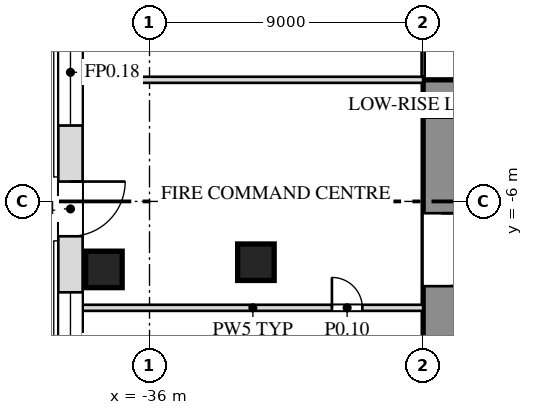
"""IFC4 building model, lengths in metres.
Left out: names, types, materials, properties, quantities, classifications, styles, units other than length and angle.
Written with IfcOpenShell. Run it as: python <this file> out.ifc"""

import sys

from ifc_helpers import new_model, si_unit, direction, frame, frame_2d, origin, origin_2d, place, context, subcontext, project, spatial, rectangle, extrude, element, fill, save


model = new_model("IFC4")
c1 = context("Model", 3, precision=1e-05, world=origin(), true_north=direction((0.0, 1.0)))
c2 = subcontext(c1, "Body", "Model", "MODEL_VIEW")
j1 = project(units=[si_unit("LENGTHUNIT", "METRE"), si_unit("PLANEANGLEUNIT", "RADIAN")], contexts=[c1])
p1 = place(None, origin())
s1 = spatial("IfcSite", under=j1, at=p1, CompositionType="ELEMENT")
p2 = place(p1, origin())
s2 = spatial("IfcBuilding", under=s1, at=p2, CompositionType="ELEMENT")
p3 = place(p2, origin())
s3 = spatial("IfcBuildingStorey", under=s2, at=p3, CompositionType="ELEMENT", Elevation=0.0)
for number, where, z_axis, x_axis in (
    (1, (-37.5, -8.236, 0.0), (0.0, 0.0, 1.0), (1.0, 0.0, 0.0)),
    (2, (-32.5, -8.0, 0.0), (0.0, 0.0, 1.0), (1.0, 0.0, 0.0)),
):
    element("IfcColumn", number, at=place(p3, frame(where, z_axis=z_axis, x_axis=x_axis)), inside=s3, PredefinedType="COLUMN", context=c2, shape_type="SweptSolid", body=[
        extrude(rectangle(XDim=1.2, YDim=1.2, at=origin_2d()), origin(), (0.0, 0.0, 1.0), 9.0),
    ])
p4 = place(p3, frame((-27.0, -2.6, 0.0), z_axis=(0.0, 0.0, 1.0), x_axis=(1.0, 0.0, 0.0)))
e3 = element("IfcWall", 3, at=p4, inside=s3, PredefinedType="SHEAR", context=c2, shape_type="SweptSolid", body=[
    extrude(rectangle(XDim=54.0, YDim=1.2, at=frame_2d((27.0, 0.0))), origin(), (0.0, 0.0, 1.0), 8.7),
])
p5 = place(p4, frame((15.15, 0.0, 0.0)))
e4 = element("IfcOpeningElement", 4, at=p5, cuts=e3, PredefinedType="OPENING", context=c2, shape_type="SweptSolid", body=[
    extrude(rectangle(XDim=2.4, YDim=2.1, at=frame_2d((1.2, 1.05))), frame((0.0, 0.612, 0.0), z_axis=(0.0, -1.0, 0.0), x_axis=(1.0, 0.0, 0.0)), (0.0, 0.0, 1.0), 1.224),
])
p6 = place(p4, frame((36.45, 0.0, 0.0)))
e5 = element("IfcOpeningElement", 5, at=p6, cuts=e3, PredefinedType="OPENING", context=c2, shape_type="SweptSolid", body=[
    extrude(rectangle(XDim=2.4, YDim=2.1, at=frame_2d((1.2, 1.05))), frame((0.0, 0.612, 0.0), z_axis=(0.0, -1.0, 0.0), x_axis=(1.0, 0.0, 0.0)), (0.0, 0.0, 1.0), 1.224),
])
p7 = place(p3, frame((-26.4, -12.8, 0.0), z_axis=(0.0, 0.0, 1.0), x_axis=(0.0, 1.0, 0.0)))
e6 = element("IfcWall", 6, at=p7, inside=s3, PredefinedType="SHEAR", context=c2, shape_type="SweptSolid", body=[
    extrude(rectangle(XDim=9.6, YDim=1.2, at=frame_2d((4.8, 0.0))), origin(), (0.0, 0.0, 1.0), 8.7),
])
p8 = place(p7, frame((4.012, 0.0, 0.0)))
e7 = element("IfcOpeningElement", 7, at=p8, cuts=e6, PredefinedType="OPENING", context=c2, shape_type="SweptSolid", body=[
    extrude(rectangle(XDim=2.4, YDim=2.1, at=frame_2d((1.2, 1.05))), frame((0.0, 0.612, 0.0), z_axis=(0.0, -1.0, 0.0), x_axis=(1.0, 0.0, 0.0)), (0.0, 0.0, 1.0), 1.224),
])
p9 = place(p3, frame((-38.2, -9.5, 0.0), z_axis=(0.0, 0.0, 1.0), x_axis=(1.0, 0.0, 0.0)))
e8 = element("IfcWall", 8, at=p9, inside=s3, PredefinedType="PARTITIONING", context=c2, shape_type="SweptSolid", body=[
    extrude(rectangle(XDim=11.2, YDim=0.2, at=frame_2d((5.6, 0.0))), origin(), (0.0, 0.0, 1.0), 8.7),
])
p10 = place(p9, frame((8.2, 0.0, 0.0)))
e9 = element("IfcOpeningElement", 9, at=p10, cuts=e8, PredefinedType="OPENING", context=c2, shape_type="SweptSolid", body=[
    extrude(rectangle(XDim=1.0, YDim=2.1, at=frame_2d((0.5, 1.05))), frame((0.0, 0.112, 0.0), z_axis=(0.0, -1.0, 0.0), x_axis=(1.0, 0.0, 0.0)), (0.0, 0.0, 1.0), 0.224),
])
p11 = place(p3, frame((-38.2, -2.0, 0.0), z_axis=(0.0, 0.0, 1.0), x_axis=(1.0, 0.0, 0.0)))
e10 = element("IfcWall", 10, at=p11, inside=s3, PredefinedType="PARTITIONING", context=c2, shape_type="SweptSolid", body=[
    extrude(rectangle(XDim=11.2, YDim=0.2, at=frame_2d((5.6, 0.0))), origin(), (0.0, 0.0, 1.0), 8.7),
])
p12 = place(p3, frame((-27.0, -1.9, 0.0), z_axis=(0.0, 0.0, 1.0), x_axis=(0.0, 1.0, 0.0)))
e11 = element("IfcWall", 11, at=p12, inside=s3, PredefinedType="PARTITIONING", context=c2, shape_type="SweptSolid", body=[
    extrude(rectangle(XDim=5.85, YDim=0.1, at=frame_2d((2.925, 0.0))), origin(), (0.0, 0.0, 1.0), 8.088),
])
p13 = place(p12, frame((2.4, 0.0, 0.0)))
e12 = element("IfcOpeningElement", 12, at=p13, cuts=e11, PredefinedType="OPENING", context=c2, shape_type="SweptSolid", body=[
    extrude(rectangle(XDim=1.0, YDim=2.1, at=frame_2d((0.5, 1.05))), frame((0.0, 0.062, 0.0), z_axis=(0.0, -1.0, 0.0), x_axis=(1.0, 0.0, 0.0)), (0.0, 0.0, 1.0), 0.124),
])
p14 = place(p3, frame((-38.6, 13.948, 0.0), z_axis=(0.0, 0.0, 1.0), x_axis=(0.0, -1.0, 0.0)))
e13 = element("IfcWall", 13, at=p14, inside=s3, PredefinedType="SOLIDWALL", context=c2, shape_type="SweptSolid", body=[
    extrude(rectangle(XDim=35.895, YDim=0.8, at=frame_2d((17.948, 0.0))), origin(), (0.0, 0.0, 1.0), 8.7),
])
p15 = place(p14, frame((4.964, 0.0, 1.0)))
e14 = element("IfcOpeningElement", 14, at=p15, cuts=e13, PredefinedType="OPENING", context=c2, shape_type="SweptSolid", body=[
    extrude(rectangle(XDim=3.5, YDim=5.5, at=frame_2d((1.75, 2.75))), frame((0.0, 0.412, 0.0), z_axis=(0.0, -1.0, 0.0), x_axis=(1.0, 0.0, 0.0)), (0.0, 0.0, 1.0), 0.824),
])
p16 = place(p14, frame((9.458, 0.0, 1.0)))
e15 = element("IfcOpeningElement", 15, at=p16, cuts=e13, PredefinedType="OPENING", context=c2, shape_type="SweptSolid", body=[
    extrude(rectangle(XDim=3.5, YDim=5.5, at=frame_2d((1.75, 2.75))), frame((0.0, 0.412, 0.0), z_axis=(0.0, -1.0, 0.0), x_axis=(1.0, 0.0, 0.0)), (0.0, 0.0, 1.0), 0.824),
])
p17 = place(p14, frame((13.951, 0.0, 1.0)))
e16 = element("IfcOpeningElement", 16, at=p17, cuts=e13, PredefinedType="OPENING", context=c2, shape_type="SweptSolid", body=[
    extrude(rectangle(XDim=3.5, YDim=5.5, at=frame_2d((1.75, 2.75))), frame((0.0, 0.412, 0.0), z_axis=(0.0, -1.0, 0.0), x_axis=(1.0, 0.0, 0.0)), (0.0, 0.0, 1.0), 0.824),
])
p18 = place(p14, frame((22.938, 0.0, 1.0)))
e17 = element("IfcOpeningElement", 17, at=p18, cuts=e13, PredefinedType="OPENING", context=c2, shape_type="SweptSolid", body=[
    extrude(rectangle(XDim=3.5, YDim=5.5, at=frame_2d((1.75, 2.75))), frame((0.0, 0.412, 0.0), z_axis=(0.0, -1.0, 0.0), x_axis=(1.0, 0.0, 0.0)), (0.0, 0.0, 1.0), 0.824),
])
p19 = place(p14, frame((27.431, 0.0, 1.0)))
e18 = element("IfcOpeningElement", 18, at=p19, cuts=e13, PredefinedType="OPENING", context=c2, shape_type="SweptSolid", body=[
    extrude(rectangle(XDim=3.5, YDim=5.5, at=frame_2d((1.75, 2.75))), frame((0.0, 0.412, 0.0), z_axis=(0.0, -1.0, 0.0), x_axis=(1.0, 0.0, 0.0)), (0.0, 0.0, 1.0), 0.824),
])
p20 = place(p14, frame((19.294, 0.0, 0.0)))
e19 = element("IfcOpeningElement", 19, at=p20, cuts=e13, PredefinedType="OPENING", context=c2, shape_type="SweptSolid", body=[
    extrude(rectangle(XDim=1.8, YDim=2.4, at=frame_2d((0.9, 1.2))), frame((0.0, 0.412, 0.0), z_axis=(0.0, -1.0, 0.0), x_axis=(1.0, 0.0, 0.0)), (0.0, 0.0, 1.0), 0.824),
])
p21 = place(p10, origin())
e20 = element("IfcDoor", 20, at=p21, inside=s3, OperationType="SINGLE_SWING_LEFT", PredefinedType="DOOR", context=c2, shape_type="SweptSolid", body=[
    extrude(rectangle(XDim=1.0, YDim=2.1, at=frame_2d((0.5, 1.05))), frame((0.0, 0.025, 0.0), z_axis=(0.0, -1.0, 0.0), x_axis=(1.0, 0.0, 0.0)), (0.0, 0.0, 1.0), 0.05),
])
fill(e9, e20)
p22 = place(p17, origin())
e21 = element("IfcWindow", 21, at=p22, inside=s3, PartitioningType="SINGLE_PANEL", PredefinedType="WINDOW", context=c2, shape_type="SweptSolid", body=[
    extrude(rectangle(XDim=3.5, YDim=5.5, at=frame_2d((1.75, 2.75))), frame((0.0, 0.03, 0.0), z_axis=(0.0, -1.0, 0.0), x_axis=(1.0, 0.0, 0.0)), (0.0, 0.0, 1.0), 0.06),
])
fill(e16, e21)
p23 = place(p18, origin())
e22 = element("IfcWindow", 22, at=p23, inside=s3, PartitioningType="SINGLE_PANEL", PredefinedType="WINDOW", context=c2, shape_type="SweptSolid", body=[
    extrude(rectangle(XDim=3.5, YDim=5.5, at=frame_2d((1.75, 2.75))), frame((0.0, 0.03, 0.0), z_axis=(0.0, -1.0, 0.0), x_axis=(1.0, 0.0, 0.0)), (0.0, 0.0, 1.0), 0.06),
])
fill(e17, e22)
p24 = place(p20, frame((1.8, 0.0, 0.0), z_axis=(0.0, 0.0, 1.0), x_axis=(-1.0, 0.0, 0.0)))
e23 = element("IfcDoor", 23, at=p24, inside=s3, OperationType="DOUBLE_DOOR_SINGLE_SWING", PredefinedType="DOOR", context=c2, shape_type="SweptSolid", body=[
    extrude(rectangle(XDim=1.8, YDim=2.4, at=frame_2d((0.9, 1.2))), frame((0.0, 0.025, 0.0), z_axis=(0.0, -1.0, 0.0), x_axis=(1.0, 0.0, 0.0)), (0.0, 0.0, 1.0), 0.05),
])
fill(e19, e23)
p25 = place(p8, origin())
e24 = element("IfcDoor", 24, at=p25, inside=s3, OperationType="DOUBLE_DOOR_SINGLE_SWING", PredefinedType="DOOR", context=c2, shape_type="SweptSolid", body=[
    extrude(rectangle(XDim=2.4, YDim=2.1, at=frame_2d((1.2, 1.05))), frame((0.0, 0.025, 0.0), z_axis=(0.0, -1.0, 0.0), x_axis=(1.0, 0.0, 0.0)), (0.0, 0.0, 1.0), 0.05),
])
fill(e7, e24)
save(model, sys.argv[1])
